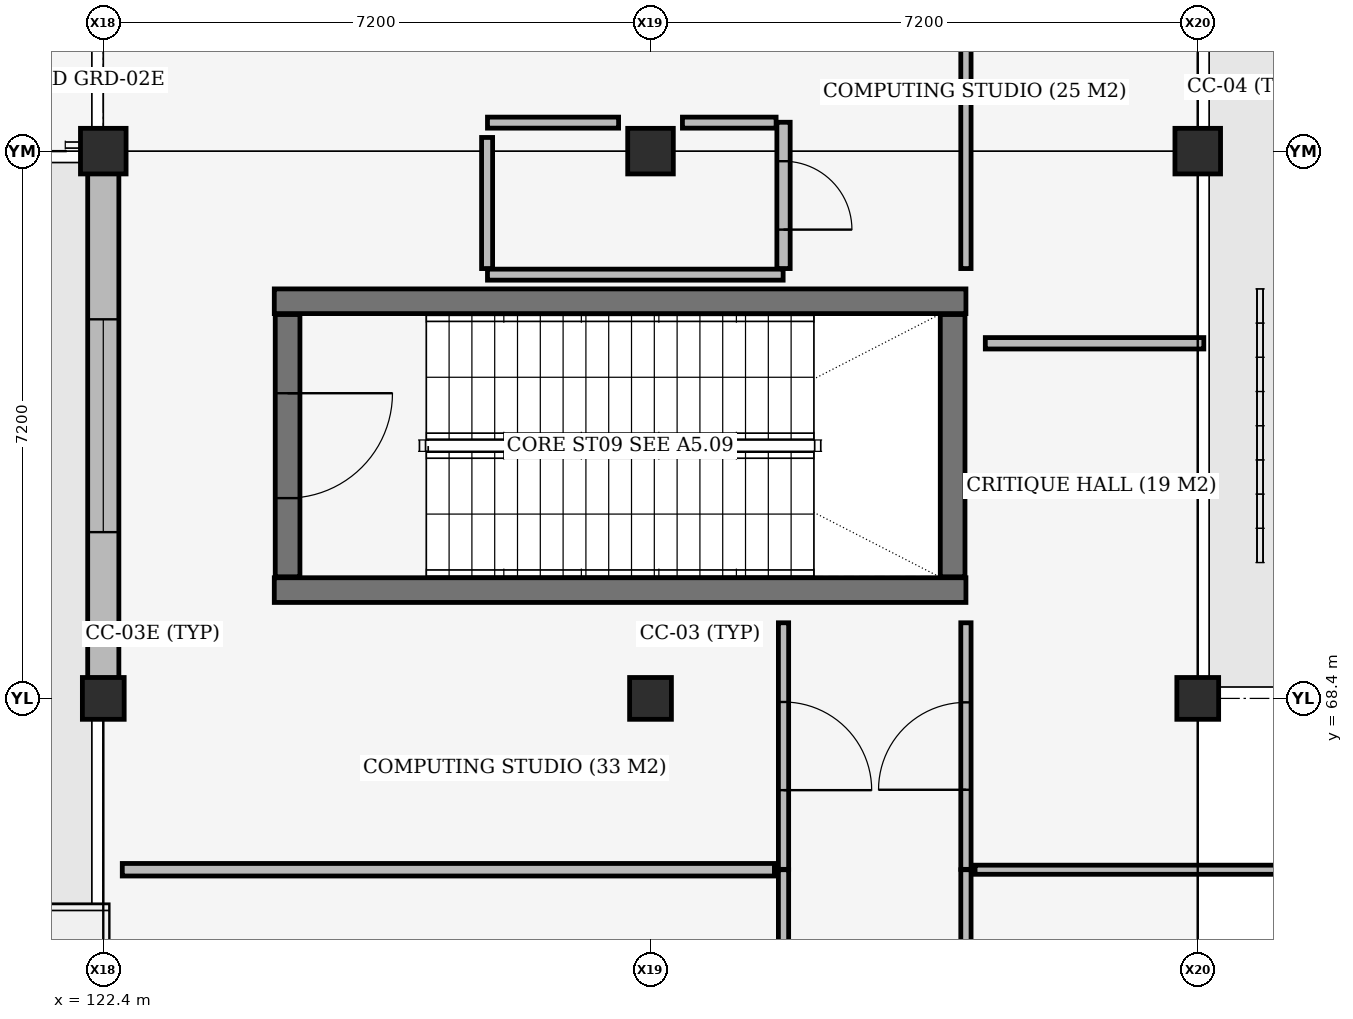
"""IFC4 building model, lengths in metres.
Left out: names, types, materials, properties, quantities, classifications, styles, units other than length and angle.
Written with IfcOpenShell. Run it as: python <this file> out.ifc"""

import sys

from ifc_helpers import new_model, si_unit, direction, frame, frame_2d, origin, origin_2d, place, context, subcontext, project, spatial, rectangle, extrude, element, fill, save


model = new_model("IFC4")
c1 = context("Model", 3, precision=1e-05, world=origin(), true_north=direction((0.0, 1.0)))
c2 = subcontext(c1, "Body", "Model", "MODEL_VIEW")
j1 = project(units=[si_unit("LENGTHUNIT", "METRE"), si_unit("PLANEANGLEUNIT", "RADIAN")], contexts=[c1])
p1 = place(None, origin())
s1 = spatial("IfcSite", under=j1, at=p1, CompositionType="ELEMENT")
p2 = place(p1, origin())
s2 = spatial("IfcBuilding", under=s1, at=p2, CompositionType="ELEMENT")
p3 = place(p2, origin())
s3 = spatial("IfcBuildingStorey", under=s2, at=p3, CompositionType="ELEMENT", Elevation=0.0)
p4 = place(p3, frame((122.4, 68.4, 0.0), z_axis=(0.0, 0.0, 1.0), x_axis=(1.0, 0.0, 0.0)))
e1 = element("IfcColumn", 1, at=p4, inside=s3, PredefinedType="COLUMN", context=c2, shape_type="SweptSolid", body=[
    extrude(rectangle(XDim=0.55, YDim=0.55, at=origin_2d()), origin(), (0.0, 0.0, 1.0), 5.1),
])
p5 = place(p3, frame((122.4, 75.6, 0.0), z_axis=(0.0, 0.0, 1.0), x_axis=(1.0, 0.0, 0.0)))
e2 = element("IfcColumn", 2, at=p5, inside=s3, PredefinedType="COLUMN", context=c2, shape_type="SweptSolid", body=[
    extrude(rectangle(XDim=0.6, YDim=0.6, at=origin_2d()), origin(), (0.0, 0.0, 1.0), 5.1),
])
p6 = place(p3, frame((129.6, 68.4, 0.0), z_axis=(0.0, 0.0, 1.0), x_axis=(1.0, 0.0, 0.0)))
e3 = element("IfcColumn", 3, at=p6, inside=s3, PredefinedType="COLUMN", context=c2, shape_type="SweptSolid", body=[
    extrude(rectangle(XDim=0.55, YDim=0.55, at=origin_2d()), origin(), (0.0, 0.0, 1.0), 5.1),
])
p7 = place(p3, frame((129.6, 75.6, 0.0), z_axis=(0.0, 0.0, 1.0), x_axis=(1.0, 0.0, 0.0)))
e4 = element("IfcColumn", 4, at=p7, inside=s3, PredefinedType="COLUMN", context=c2, shape_type="SweptSolid", body=[
    extrude(rectangle(XDim=0.6, YDim=0.6, at=origin_2d()), origin(), (0.0, 0.0, 1.0), 5.1),
])
p8 = place(p3, frame((136.8, 68.4, 0.0), z_axis=(0.0, 0.0, 1.0), x_axis=(1.0, 0.0, 0.0)))
e5 = element("IfcColumn", 5, at=p8, inside=s3, PredefinedType="COLUMN", context=c2, shape_type="SweptSolid", body=[
    extrude(rectangle(XDim=0.55, YDim=0.55, at=origin_2d()), origin(), (0.0, 0.0, 1.0), 5.1),
])
p9 = place(p3, frame((136.8, 75.6, 0.0), z_axis=(0.0, 0.0, 1.0), x_axis=(1.0, 0.0, 0.0)))
e6 = element("IfcColumn", 6, at=p9, inside=s3, PredefinedType="COLUMN", context=c2, shape_type="SweptSolid", body=[
    extrude(rectangle(XDim=0.6, YDim=0.6, at=origin_2d()), origin(), (0.0, 0.0, 1.0), 5.1),
])
for number, where, z_axis, x_axis in (
    (7, (124.65, 69.825, 0.0), (0.0, 0.0, 1.0), (1.0, 0.0, 0.0)),
    (8, (133.75, 73.625, 0.0), (0.0, 0.0, 1.0), (-1.0, 0.0, 0.0)),
):
    element("IfcWall", number, at=place(p3, frame(where, z_axis=z_axis, x_axis=x_axis)), inside=s3, PredefinedType="SHEAR", context=c2, shape_type="SweptSolid", body=[
        extrude(rectangle(XDim=9.1, YDim=0.325, at=frame_2d((4.55, 0.0))), origin(), (0.0, 0.0, 1.0), 5.1),
    ])
p10 = place(p3, frame((133.575, 70.0, 0.0), z_axis=(0.0, 0.0, 1.0), x_axis=(0.0, 1.0, 0.0)))
e9 = element("IfcWall", 9, at=p10, inside=s3, PredefinedType="SHEAR", context=c2, shape_type="SweptSolid", body=[
    extrude(rectangle(XDim=3.45, YDim=0.325, at=frame_2d((1.725, 0.0))), origin(), (0.0, 0.0, 1.0), 5.1),
])
p11 = place(p3, frame((122.4, 68.667, 0.0), z_axis=(0.0, 0.0, 1.0), x_axis=(0.0, 1.0, 0.0)))
e10 = element("IfcWall", 10, at=p11, inside=s3, PredefinedType="STANDARD", context=c2, shape_type="SweptSolid", body=[
    extrude(rectangle(XDim=6.641, YDim=0.41, at=frame_2d((3.321, 0.0))), origin(), (0.0, 0.0, 1.0), 4.5),
])
p12 = place(p11, frame((1.92, 0.0, 0.85)))
e11 = element("IfcOpeningElement", 11, at=p12, cuts=e10, PredefinedType="OPENING", context=c2, shape_type="SweptSolid", body=[
    extrude(rectangle(XDim=2.8, YDim=2.4, at=frame_2d((1.4, 1.2))), frame((0.0, 0.215, 0.0), z_axis=(0.0, -1.0, 0.0), x_axis=(1.0, 0.0, 0.0)), (0.0, 0.0, 1.0), 0.43),
])
p13 = place(p3, frame((124.825, 73.45, 0.0), z_axis=(0.0, 0.0, 1.0), x_axis=(0.0, -1.0, 0.0)))
e12 = element("IfcWall", 12, at=p13, inside=s3, PredefinedType="SHEAR", context=c2, shape_type="SweptSolid", body=[
    extrude(rectangle(XDim=3.45, YDim=0.325, at=frame_2d((1.725, 0.0))), origin(), (0.0, 0.0, 1.0), 5.1),
])
p14 = place(p13, frame((1.035, 0.0, 0.0)))
e13 = element("IfcOpeningElement", 13, at=p14, cuts=e12, PredefinedType="OPENING", context=c2, shape_type="SweptSolid", body=[
    extrude(rectangle(XDim=1.38, YDim=2.2, at=frame_2d((0.69, 1.1))), frame((0.0, 0.172, 0.0), z_axis=(0.0, -1.0, 0.0), x_axis=(1.0, 0.0, 0.0)), (0.0, 0.0, 1.0), 0.345),
])
p15 = place(p3, frame((131.35, 74.055, 0.0), z_axis=(0.0, 0.0, 1.0), x_axis=(0.0, 1.0, 0.0)))
e14 = element("IfcWall", 14, at=p15, inside=s3, PredefinedType="PLUMBINGWALL", context=c2, shape_type="SweptSolid", body=[
    extrude(rectangle(XDim=1.925, YDim=0.175, at=frame_2d((0.962, 0.0))), origin(), (0.0, 0.0, 1.0), 4.4),
])
p16 = place(p15, frame((0.512, 0.0, 0.0)))
e15 = element("IfcOpeningElement", 15, at=p16, cuts=e14, PredefinedType="OPENING", context=c2, shape_type="SweptSolid", body=[
    extrude(rectangle(XDim=0.9, YDim=2.1, at=frame_2d((0.45, 1.05))), frame((0.0, 0.097, 0.0), z_axis=(0.0, -1.0, 0.0), x_axis=(1.0, 0.0, 0.0)), (0.0, 0.0, 1.0), 0.195),
])
p17 = place(p3, frame((127.45, 74.055, 0.0), z_axis=(0.0, 0.0, 1.0), x_axis=(0.0, 1.0, 0.0)))
e16 = element("IfcWall", 16, at=p17, inside=s3, PredefinedType="PLUMBINGWALL", context=c2, shape_type="SweptSolid", body=[
    extrude(rectangle(XDim=1.725, YDim=0.145, at=frame_2d((0.863, 0.0))), origin(), (0.0, 0.0, 1.0), 4.45),
])
p18 = place(p3, frame((131.35, 55.762, 0.0), z_axis=(0.0, 0.0, 1.0), x_axis=(0.0, 1.0, 0.0)))
e17 = element("IfcWall", 17, at=p18, inside=s3, PredefinedType="PARTITIONING", context=c2, shape_type="SweptSolid", body=[
    extrude(rectangle(XDim=10.384, YDim=0.135, at=frame_2d((5.192, 0.0))), origin(), (0.0, 0.0, 1.0), 4.45),
])
p19 = place(p18, frame((4.617, 0.0, 0.0)))
e18 = element("IfcOpeningElement", 18, at=p19, cuts=e17, PredefinedType="OPENING", context=c2, shape_type="SweptSolid", body=[
    extrude(rectangle(XDim=1.15, YDim=2.2, at=frame_2d((0.575, 1.1))), frame((0.0, 0.077, 0.0), z_axis=(0.0, -1.0, 0.0), x_axis=(1.0, 0.0, 0.0)), (0.0, 0.0, 1.0), 0.155),
])
p20 = place(p3, frame((122.65, 66.146, 0.0), z_axis=(0.0, 0.0, 1.0), x_axis=(1.0, 0.0, 0.0)))
e19 = element("IfcWall", 19, at=p20, inside=s3, PredefinedType="PARTITIONING", context=c2, shape_type="SweptSolid", body=[
    extrude(rectangle(XDim=8.58, YDim=0.165, at=frame_2d((4.29, 0.0))), origin(), (0.0, 0.0, 1.0), 4.35),
])
p21 = place(p3, frame((131.35, 66.151, 0.0), z_axis=(0.0, 0.0, 1.0), x_axis=(0.0, 1.0, 0.0)))
e20 = element("IfcWall", 20, at=p21, inside=s3, PredefinedType="PARTITIONING", context=c2, shape_type="SweptSolid", body=[
    extrude(rectangle(XDim=3.244, YDim=0.135, at=frame_2d((1.622, 0.0))), origin(), (0.0, 0.0, 1.0), 4.35),
])
p22 = place(p21, frame((1.042, 0.0, 0.0)))
e21 = element("IfcOpeningElement", 21, at=p22, cuts=e20, PredefinedType="OPENING", context=c2, shape_type="SweptSolid", body=[
    extrude(rectangle(XDim=1.16, YDim=2.2, at=frame_2d((0.58, 1.1))), frame((0.0, 0.077, 0.0), z_axis=(0.0, -1.0, 0.0), x_axis=(1.0, 0.0, 0.0)), (0.0, 0.0, 1.0), 0.155),
])
p23 = place(p3, frame((133.75, 57.32, 0.0), z_axis=(0.0, 0.0, 1.0), x_axis=(0.0, 1.0, 0.0)))
e22 = element("IfcWall", 22, at=p23, inside=s3, PredefinedType="PARTITIONING", context=c2, shape_type="SweptSolid", body=[
    extrude(rectangle(XDim=8.826, YDim=0.135, at=frame_2d((4.413, 0.0))), origin(), (0.0, 0.0, 1.0), 4.45),
])
p24 = place(p23, frame((3.833, 0.0, 0.0)))
e23 = element("IfcOpeningElement", 23, at=p24, cuts=e22, PredefinedType="OPENING", context=c2, shape_type="SweptSolid", body=[
    extrude(rectangle(XDim=1.16, YDim=2.2, at=frame_2d((0.58, 1.1))), frame((0.0, 0.077, 0.0), z_axis=(0.0, -1.0, 0.0), x_axis=(1.0, 0.0, 0.0)), (0.0, 0.0, 1.0), 0.155),
])
p25 = place(p3, frame((133.87, 66.146, 0.0), z_axis=(0.0, 0.0, 1.0), x_axis=(1.0, 0.0, 0.0)))
e24 = element("IfcWall", 24, at=p25, inside=s3, PredefinedType="PARTITIONING", context=c2, shape_type="SweptSolid", body=[
    extrude(rectangle(XDim=26.11, YDim=0.12, at=frame_2d((13.055, 0.0))), origin(), (0.0, 0.0, 1.0), 4.45),
])
p26 = place(p3, frame((133.75, 66.151, 0.0), z_axis=(0.0, 0.0, 1.0), x_axis=(0.0, 1.0, 0.0)))
e25 = element("IfcWall", 25, at=p26, inside=s3, PredefinedType="PARTITIONING", context=c2, shape_type="SweptSolid", body=[
    extrude(rectangle(XDim=3.244, YDim=0.135, at=frame_2d((1.622, 0.0))), origin(), (0.0, 0.0, 1.0), 4.35),
])
p27 = place(p26, frame((1.047, 0.0, 0.0)))
e26 = element("IfcOpeningElement", 26, at=p27, cuts=e25, PredefinedType="OPENING", context=c2, shape_type="SweptSolid", body=[
    extrude(rectangle(XDim=1.15, YDim=2.2, at=frame_2d((0.575, 1.1))), frame((0.0, 0.077, 0.0), z_axis=(0.0, -1.0, 0.0), x_axis=(1.0, 0.0, 0.0)), (0.0, 0.0, 1.0), 0.155),
])
p28 = place(p3, frame((134.005, 73.072, 0.0), z_axis=(0.0, 0.0, 1.0), x_axis=(1.0, 0.0, 0.0)))
e27 = element("IfcWall", 27, at=p28, inside=s3, PredefinedType="PARTITIONING", context=c2, shape_type="SweptSolid", body=[
    extrude(rectangle(XDim=2.875, YDim=0.15, at=frame_2d((1.438, 0.0))), origin(), (0.0, 0.0, 1.0), 4.4),
])
p29 = place(p3, frame((133.75, 74.055, 0.0), z_axis=(0.0, 0.0, 1.0), x_axis=(0.0, 1.0, 0.0)))
e28 = element("IfcWall", 28, at=p29, inside=s3, PredefinedType="PARTITIONING", context=c2, shape_type="SweptSolid", body=[
    extrude(rectangle(XDim=7.674, YDim=0.135, at=frame_2d((3.837, 0.0))), origin(), (0.0, 0.0, 1.0), 4.4),
])
p30 = place(p29, frame((3.257, 0.0, 0.0)))
e29 = element("IfcOpeningElement", 29, at=p30, cuts=e28, PredefinedType="OPENING", context=c2, shape_type="SweptSolid", body=[
    extrude(rectangle(XDim=1.16, YDim=2.2, at=frame_2d((0.58, 1.1))), frame((0.0, 0.077, 0.0), z_axis=(0.0, -1.0, 0.0), x_axis=(1.0, 0.0, 0.0)), (0.0, 0.0, 1.0), 0.155),
])
p31 = place(p3, frame((127.455, 73.975, 0.0), z_axis=(0.0, 0.0, 1.0), x_axis=(1.0, 0.0, 0.0)))
e30 = element("IfcWall", 30, at=p31, inside=s3, PredefinedType="PLUMBINGWALL", context=c2, shape_type="SweptSolid", body=[
    extrude(rectangle(XDim=3.89, YDim=0.145, at=frame_2d((1.945, 0.0))), origin(), (0.0, 0.0, 1.0), 5.1),
])
p32 = place(p3, frame((127.455, 75.975, 0.0), z_axis=(0.0, 0.0, 1.0), x_axis=(1.0, 0.0, 0.0)))
e31 = element("IfcWall", 31, at=p32, inside=s3, PredefinedType="PLUMBINGWALL", context=c2, shape_type="SweptSolid", body=[
    extrude(rectangle(XDim=1.725, YDim=0.145, at=frame_2d((0.862, 0.0))), origin(), (0.0, 0.0, 1.0), 5.1),
])
p33 = place(p3, frame((130.02, 75.975, 0.0), z_axis=(0.0, 0.0, 1.0), x_axis=(1.0, 0.0, 0.0)))
e32 = element("IfcWall", 32, at=p33, inside=s3, PredefinedType="PLUMBINGWALL", context=c2, shape_type="SweptSolid", body=[
    extrude(rectangle(XDim=1.232, YDim=0.145, at=frame_2d((0.616, 0.0))), origin(), (0.0, 0.0, 1.0), 5.1),
])
p34 = place(p12, origin())
e33 = element("IfcWindow", 33, at=p34, inside=s3, PartitioningType="DOUBLE_PANEL_VERTICAL", PredefinedType="WINDOW", context=c2, shape_type="SweptSolid", body=[
    extrude(rectangle(XDim=2.8, YDim=2.4, at=frame_2d((1.4, 1.2))), frame((0.0, 0.03, 0.0), z_axis=(0.0, -1.0, 0.0), x_axis=(1.0, 0.0, 0.0)), (0.0, 0.0, 1.0), 0.06),
])
fill(e11, e33)
p35 = place(p14, origin())
e34 = element("IfcDoor", 34, at=p35, inside=s3, OperationType="DOUBLE_DOOR_SINGLE_SWING", PredefinedType="DOOR", context=c2, shape_type="SweptSolid", body=[
    extrude(rectangle(XDim=1.38, YDim=2.2, at=frame_2d((0.69, 1.1))), frame((0.0, 0.025, 0.0), z_axis=(0.0, -1.0, 0.0), x_axis=(1.0, 0.0, 0.0)), (0.0, 0.0, 1.0), 0.05),
])
fill(e13, e34)
p36 = place(p16, origin())
e35 = element("IfcDoor", 35, at=p36, inside=s3, OperationType="SINGLE_SWING_RIGHT", PredefinedType="DOOR", context=c2, shape_type="SweptSolid", body=[
    extrude(rectangle(XDim=0.9, YDim=2.1, at=frame_2d((0.45, 1.05))), frame((0.0, 0.025, 0.0), z_axis=(0.0, -1.0, 0.0), x_axis=(1.0, 0.0, 0.0)), (0.0, 0.0, 1.0), 0.05),
])
fill(e15, e35)
p37 = place(p22, origin())
e36 = element("IfcDoor", 36, at=p37, inside=s3, OperationType="SINGLE_SWING_RIGHT", PredefinedType="DOOR", context=c2, shape_type="SweptSolid", body=[
    extrude(rectangle(XDim=1.16, YDim=2.2, at=frame_2d((0.58, 1.1))), frame((0.0, 0.025, 0.0), z_axis=(0.0, -1.0, 0.0), x_axis=(1.0, 0.0, 0.0)), (0.0, 0.0, 1.0), 0.05),
])
fill(e21, e36)
p38 = place(p27, origin())
e37 = element("IfcDoor", 37, at=p38, inside=s3, OperationType="SINGLE_SWING_LEFT", PredefinedType="DOOR", context=c2, shape_type="SweptSolid", body=[
    extrude(rectangle(XDim=1.15, YDim=2.2, at=frame_2d((0.575, 1.1))), frame((0.0, 0.025, 0.0), z_axis=(0.0, -1.0, 0.0), x_axis=(1.0, 0.0, 0.0)), (0.0, 0.0, 1.0), 0.05),
])
fill(e26, e37)
save(model, sys.argv[1])
